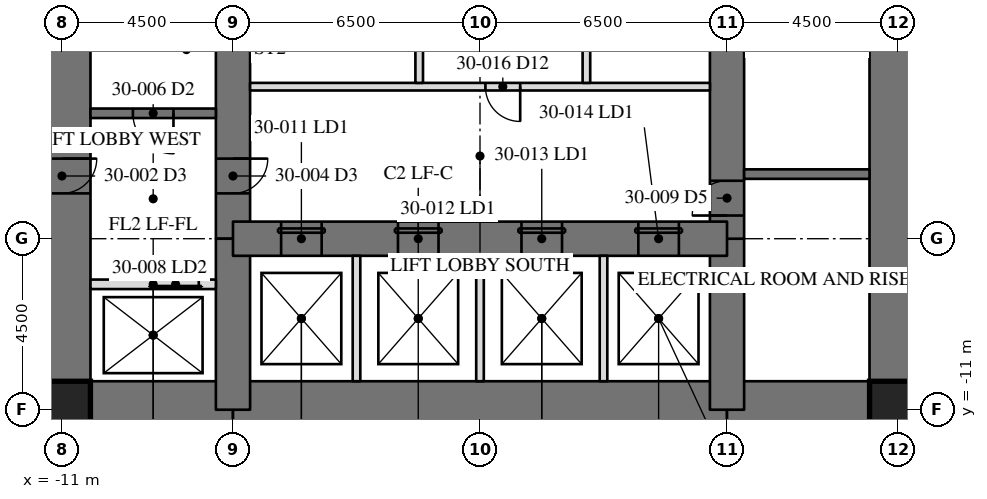
"""IFC4 building model, lengths in metres.
Left out: names, types, materials, properties, quantities, classifications, styles, units other than length and angle.
Written with IfcOpenShell. Run it as: python <this file> out.ifc"""

import sys

from ifc_helpers import new_model, si_unit, direction, frame, frame_2d, origin, origin_2d, place, context, subcontext, project, spatial, rectangle, hollow_rectangle, extrude, element, fill, save


model = new_model("IFC4")
c1 = context("Model", 3, precision=1e-05, world=origin(), true_north=direction((0.0, 1.0)))
c2 = subcontext(c1, "Body", "Model", "MODEL_VIEW")
j1 = project(units=[si_unit("LENGTHUNIT", "METRE"), si_unit("PLANEANGLEUNIT", "RADIAN")], contexts=[c1])
p1 = place(None, origin())
s1 = spatial("IfcSite", under=j1, at=p1, CompositionType="ELEMENT")
p2 = place(p1, origin())
s2 = spatial("IfcBuilding", under=s1, at=p2, CompositionType="ELEMENT")
p3 = place(p2, frame((0.0, 0.0, 129.5)))
s3 = spatial("IfcBuildingStorey", under=s2, at=p3, CompositionType="ELEMENT", Elevation=129.5)
p4 = place(p3, frame((11.0, -11.0, 0.0), z_axis=(0.0, 0.0, 1.0), x_axis=(0.0, 1.0, 0.0)))
e1 = element("IfcWall", 1, at=p4, inside=s3, PredefinedType="SHEAR", context=c2, shape_type="SweptSolid", body=[
    extrude(rectangle(XDim=22.0, YDim=1.5, at=frame_2d((11.0, 0.0))), origin(), (0.0, 0.0, 1.0), 4.1),
])
p5 = place(p4, frame((15.393, 0.0, 0.0)))
e2 = element("IfcOpeningElement", 2, at=p5, cuts=e1, PredefinedType="OPENING", context=c2, shape_type="SweptSolid", body=[
    extrude(rectangle(XDim=0.915, YDim=2.134, at=frame_2d((0.458, 1.067))), frame((0.0, 0.76, 0.0), z_axis=(0.0, -1.0, 0.0), x_axis=(1.0, 0.0, 0.0)), (0.0, 0.0, 1.0), 1.52),
])
p6 = place(p3, frame((-11.0, 11.0, 0.0), z_axis=(0.0, 0.0, 1.0), x_axis=(0.0, -1.0, 0.0)))
e3 = element("IfcWall", 3, at=p6, inside=s3, PredefinedType="SHEAR", context=c2, shape_type="SweptSolid", body=[
    extrude(rectangle(XDim=22.0, YDim=1.5, at=frame_2d((11.0, 0.0))), origin(), (0.0, 0.0, 1.0), 4.1),
])
p7 = place(p6, frame((15.393, 0.0, 0.0)))
e4 = element("IfcOpeningElement", 4, at=p7, cuts=e3, PredefinedType="OPENING", context=c2, shape_type="SweptSolid", body=[
    extrude(rectangle(XDim=0.915, YDim=2.134, at=frame_2d((0.458, 1.067))), frame((0.0, 0.76, 0.0), z_axis=(0.0, -1.0, 0.0), x_axis=(1.0, 0.0, 0.0)), (0.0, 0.0, 1.0), 1.52),
])
p8 = place(p3, frame((-11.0, -11.0, 0.0), z_axis=(0.0, 0.0, 1.0), x_axis=(1.0, 0.0, 0.0)))
e5 = element("IfcWall", 5, at=p8, inside=s3, PredefinedType="SHEAR", context=c2, shape_type="SweptSolid", body=[
    extrude(rectangle(XDim=4.5, YDim=1.5, at=frame_2d((2.25, 0.0))), origin(), (0.0, 0.0, 1.0), 4.1),
])
p9 = place(p3, frame((-6.5, -11.0, 0.0), z_axis=(0.0, 0.0, 1.0), x_axis=(1.0, 0.0, 0.0)))
e6 = element("IfcWall", 6, at=p9, inside=s3, PredefinedType="SHEAR", context=c2, shape_type="SweptSolid", body=[
    extrude(rectangle(XDim=13.0, YDim=1.5, at=frame_2d((6.5, 0.0))), origin(), (0.0, 0.0, 1.0), 4.1),
])
p10 = place(p3, frame((6.5, -11.0, 0.0), z_axis=(0.0, 0.0, 1.0), x_axis=(1.0, 0.0, 0.0)))
e7 = element("IfcWall", 7, at=p10, inside=s3, PredefinedType="SHEAR", context=c2, shape_type="SweptSolid", body=[
    extrude(rectangle(XDim=4.5, YDim=1.5, at=frame_2d((2.25, 0.0))), origin(), (0.0, 0.0, 1.0), 4.1),
])
p11 = place(p3, frame((6.5, -11.0, 0.0), z_axis=(0.0, 0.0, 1.0), x_axis=(0.0, 1.0, 0.0)))
e8 = element("IfcWall", 8, at=p11, inside=s3, PredefinedType="SHEAR", context=c2, shape_type="SweptSolid", body=[
    extrude(rectangle(XDim=4.5, YDim=0.9, at=frame_2d((2.25, 0.0))), origin(), (0.0, 0.0, 1.0), 4.1),
])
p12 = place(p3, frame((6.5, -6.5, 0.0), z_axis=(0.0, 0.0, 1.0), x_axis=(0.0, 1.0, 0.0)))
e9 = element("IfcWall", 9, at=p12, inside=s3, PredefinedType="SHEAR", context=c2, shape_type="SweptSolid", body=[
    extrude(rectangle(XDim=13.0, YDim=0.9, at=frame_2d((6.5, 0.0))), origin(), (0.0, 0.0, 1.0), 4.1),
])
p13 = place(p12, frame((10.893, 0.0, 0.0)))
e10 = element("IfcOpeningElement", 10, at=p13, cuts=e9, PredefinedType="OPENING", context=c2, shape_type="SweptSolid", body=[
    extrude(rectangle(XDim=0.915, YDim=2.134, at=frame_2d((0.458, 1.067))), frame((0.0, 0.46, 0.0), z_axis=(0.0, -1.0, 0.0), x_axis=(1.0, 0.0, 0.0)), (0.0, 0.0, 1.0), 0.92),
])
p14 = place(p12, frame((0.61, 0.0, 0.0)))
e11 = element("IfcOpeningElement", 11, at=p14, cuts=e9, PredefinedType="OPENING", context=c2, shape_type="SweptSolid", body=[
    extrude(rectangle(XDim=0.915, YDim=2.134, at=frame_2d((0.458, 1.067))), frame((0.0, 0.46, 0.0), z_axis=(0.0, -1.0, 0.0), x_axis=(1.0, 0.0, 0.0)), (0.0, 0.0, 1.0), 0.92),
])
p15 = place(p3, frame((-6.5, 6.5, 0.0), z_axis=(0.0, 0.0, 1.0), x_axis=(0.0, -1.0, 0.0)))
e12 = element("IfcWall", 12, at=p15, inside=s3, PredefinedType="SHEAR", context=c2, shape_type="SweptSolid", body=[
    extrude(rectangle(XDim=13.0, YDim=0.9, at=frame_2d((6.5, 0.0))), origin(), (0.0, 0.0, 1.0), 4.1),
])
p16 = place(p15, frame((10.893, 0.0, 0.0)))
e13 = element("IfcOpeningElement", 13, at=p16, cuts=e12, PredefinedType="OPENING", context=c2, shape_type="SweptSolid", body=[
    extrude(rectangle(XDim=0.915, YDim=2.134, at=frame_2d((0.458, 1.067))), frame((0.0, 0.46, 0.0), z_axis=(0.0, -1.0, 0.0), x_axis=(1.0, 0.0, 0.0)), (0.0, 0.0, 1.0), 0.92),
])
p17 = place(p15, frame((0.61, 0.0, 0.0)))
e14 = element("IfcOpeningElement", 14, at=p17, cuts=e12, PredefinedType="OPENING", context=c2, shape_type="SweptSolid", body=[
    extrude(rectangle(XDim=0.915, YDim=2.134, at=frame_2d((0.458, 1.067))), frame((0.0, 0.46, 0.0), z_axis=(0.0, -1.0, 0.0), x_axis=(1.0, 0.0, 0.0)), (0.0, 0.0, 1.0), 0.92),
])
p18 = place(p3, frame((-6.5, -6.5, 0.0), z_axis=(0.0, 0.0, 1.0), x_axis=(0.0, -1.0, 0.0)))
e15 = element("IfcWall", 15, at=p18, inside=s3, PredefinedType="SHEAR", context=c2, shape_type="SweptSolid", body=[
    extrude(rectangle(XDim=4.5, YDim=0.9, at=frame_2d((2.25, 0.0))), origin(), (0.0, 0.0, 1.0), 4.1),
])
p19 = place(p3, frame((-6.5, -6.5, 0.0), z_axis=(0.0, 0.0, 1.0), x_axis=(1.0, 0.0, 0.0)))
e16 = element("IfcWall", 16, at=p19, inside=s3, PredefinedType="SHEAR", context=c2, shape_type="SweptSolid", body=[
    extrude(rectangle(XDim=13.0, YDim=0.9, at=frame_2d((6.5, 0.0))), origin(), (0.0, 0.0, 1.0), 4.1),
])
p20 = place(p19, frame((1.267, 0.0, 0.0)))
e17 = element("IfcOpeningElement", 17, at=p20, cuts=e16, PredefinedType="OPENING", context=c2, shape_type="SweptSolid", body=[
    extrude(rectangle(XDim=1.067, YDim=2.134, at=frame_2d((0.533, 1.067))), frame((0.0, 0.46, 0.0), z_axis=(0.0, -1.0, 0.0), x_axis=(1.0, 0.0, 0.0)), (0.0, 0.0, 1.0), 0.92),
])
p21 = place(p19, frame((4.342, 0.0, 0.0)))
e18 = element("IfcOpeningElement", 18, at=p21, cuts=e16, PredefinedType="OPENING", context=c2, shape_type="SweptSolid", body=[
    extrude(rectangle(XDim=1.067, YDim=2.134, at=frame_2d((0.533, 1.067))), frame((0.0, 0.46, 0.0), z_axis=(0.0, -1.0, 0.0), x_axis=(1.0, 0.0, 0.0)), (0.0, 0.0, 1.0), 0.92),
])
p22 = place(p19, frame((7.592, 0.0, 0.0)))
e19 = element("IfcOpeningElement", 19, at=p22, cuts=e16, PredefinedType="OPENING", context=c2, shape_type="SweptSolid", body=[
    extrude(rectangle(XDim=1.067, YDim=2.134, at=frame_2d((0.533, 1.067))), frame((0.0, 0.46, 0.0), z_axis=(0.0, -1.0, 0.0), x_axis=(1.0, 0.0, 0.0)), (0.0, 0.0, 1.0), 0.92),
])
p23 = place(p19, frame((10.667, 0.0, 0.0)))
e20 = element("IfcOpeningElement", 20, at=p23, cuts=e16, PredefinedType="OPENING", context=c2, shape_type="SweptSolid", body=[
    extrude(rectangle(XDim=1.067, YDim=2.134, at=frame_2d((0.533, 1.067))), frame((0.0, 0.46, 0.0), z_axis=(0.0, -1.0, 0.0), x_axis=(1.0, 0.0, 0.0)), (0.0, 0.0, 1.0), 0.92),
])
for number, where, z_axis, x_axis in (
    (21, (-11.0, -11.0, 0.0), (0.0, 0.0, 1.0), (1.0, 0.0, 0.0)),
    (22, (11.0, -11.0, 0.0), (0.0, 0.0, 1.0), (1.0, 0.0, 0.0)),
):
    element("IfcColumn", number, at=place(p3, frame(where, z_axis=z_axis, x_axis=x_axis)), inside=s3, PredefinedType="COLUMN", context=c2, shape_type="SweptSolid", body=[
        extrude(hollow_rectangle(XDim=1.499, YDim=1.499, WallThickness=0.102, at=origin_2d()), origin(), (0.0, 0.0, 1.0), 4.1),
    ])
p24 = place(p3, frame((6.95, -4.8, 0.0), z_axis=(0.0, 0.0, 1.0), x_axis=(1.0, 0.0, 0.0)))
e23 = element("IfcWall", 23, at=p24, inside=s3, PredefinedType="SOLIDWALL", context=c2, shape_type="SweptSolid", body=[
    extrude(rectangle(XDim=3.3, YDim=0.25, at=frame_2d((1.65, 0.0))), origin(), (0.0, 0.0, 1.0), 3.91),
])
p25 = place(p3, frame((-6.95, -3.2, 0.0), z_axis=(0.0, 0.0, 1.0), x_axis=(-1.0, 0.0, 0.0)))
e24 = element("IfcWall", 24, at=p25, inside=s3, PredefinedType="SOLIDWALL", context=c2, shape_type="SweptSolid", body=[
    extrude(rectangle(XDim=3.3, YDim=0.25, at=frame_2d((1.65, 0.0))), origin(), (0.0, 0.0, 1.0), 3.91),
])
p26 = place(p25, frame((1.116, 0.0, 0.0)))
e25 = element("IfcOpeningElement", 25, at=p26, cuts=e24, PredefinedType="OPENING", context=c2, shape_type="SweptSolid", body=[
    extrude(rectangle(XDim=1.067, YDim=2.134, at=frame_2d((0.533, 1.067))), frame((0.0, 0.135, 0.0), z_axis=(0.0, -1.0, 0.0), x_axis=(1.0, 0.0, 0.0)), (0.0, 0.0, 1.0), 0.27),
])
p27 = place(p3, frame((-6.95, -7.7, 0.0), z_axis=(0.0, 0.0, 1.0), x_axis=(-1.0, 0.0, 0.0)))
e26 = element("IfcWall", 26, at=p27, inside=s3, PredefinedType="PARTITIONING", context=c2, shape_type="SweptSolid", body=[
    extrude(rectangle(XDim=3.3, YDim=0.25, at=frame_2d((1.65, 0.0))), origin(), (0.0, 0.0, 1.0), 3.91),
])
p28 = place(p27, frame((0.45, 0.0, 0.0)))
e27 = element("IfcOpeningElement", 27, at=p28, cuts=e26, PredefinedType="OPENING", context=c2, shape_type="SweptSolid", body=[
    extrude(rectangle(XDim=1.219, YDim=2.134, at=frame_2d((0.609, 1.067))), frame((0.0, 0.135, 0.0), z_axis=(0.0, -1.0, 0.0), x_axis=(1.0, 0.0, 0.0)), (0.0, 0.0, 1.0), 0.27),
])
p29 = place(p3, frame((6.05, -2.5, 0.0), z_axis=(0.0, 0.0, 1.0), x_axis=(-1.0, 0.0, 0.0)))
e28 = element("IfcWall", 28, at=p29, inside=s3, PredefinedType="PARTITIONING", context=c2, shape_type="SweptSolid", body=[
    extrude(rectangle(XDim=12.1, YDim=0.2, at=frame_2d((6.05, 0.0))), origin(), (0.0, 0.0, 1.0), 3.91),
])
p30 = place(p29, frame((4.992, 0.0, 0.0)))
e29 = element("IfcOpeningElement", 29, at=p30, cuts=e28, PredefinedType="OPENING", context=c2, shape_type="SweptSolid", body=[
    extrude(rectangle(XDim=0.915, YDim=2.134, at=frame_2d((0.458, 1.067))), frame((0.0, 0.11, 0.0), z_axis=(0.0, -1.0, 0.0), x_axis=(1.0, 0.0, 0.0)), (0.0, 0.0, 1.0), 0.22),
])
for number, where, z_axis, x_axis in (
    (30, (-3.25, -10.25, 0.0), (0.0, 0.0, 1.0), (0.0, 1.0, 0.0)),
    (31, (0.0, -10.25, 0.0), (0.0, 0.0, 1.0), (0.0, 1.0, 0.0)),
    (32, (3.25, -10.25, 0.0), (0.0, 0.0, 1.0), (0.0, 1.0, 0.0)),
):
    element("IfcWall", number, at=place(p3, frame(where, z_axis=z_axis, x_axis=x_axis)), inside=s3, PredefinedType="PARTITIONING", context=c2, shape_type="SweptSolid", body=[
        extrude(rectangle(XDim=3.3, YDim=0.2, at=frame_2d((1.65, 0.0))), origin(), (0.0, 0.0, 1.0), 3.91),
    ])
for number, where, z_axis, x_axis in (
    (33, (-1.6, -2.4, 0.0), (0.0, 0.0, 1.0), (0.0, 1.0, 0.0)),
    (34, (2.8, -2.4, 0.0), (0.0, 0.0, 1.0), (0.0, 1.0, 0.0)),
):
    element("IfcWall", number, at=place(p3, frame(where, z_axis=z_axis, x_axis=x_axis)), inside=s3, PredefinedType="PARTITIONING", context=c2, shape_type="SweptSolid", body=[
        extrude(rectangle(XDim=4.8, YDim=0.2, at=frame_2d((2.4, 0.0))), origin(), (0.0, 0.0, 1.0), 3.91),
    ])
p31 = place(p16, origin())
e35 = element("IfcDoor", 35, at=p31, inside=s3, OperationType="SINGLE_SWING_RIGHT", PredefinedType="DOOR", context=c2, shape_type="SweptSolid", body=[
    extrude(rectangle(XDim=0.915, YDim=2.134, at=frame_2d((0.458, 1.067))), frame((0.0, -0.375, 0.0), z_axis=(0.0, -1.0, 0.0), x_axis=(1.0, 0.0, 0.0)), (0.0, 0.0, 1.0), 0.05),
])
fill(e13, e35)
p32 = place(p26, origin())
e36 = element("IfcDoor", 36, at=p32, inside=s3, OperationType="SINGLE_SWING_LEFT", PredefinedType="DOOR", context=c2, shape_type="SweptSolid", body=[
    extrude(rectangle(XDim=1.067, YDim=2.134, at=frame_2d((0.533, 1.067))), frame((0.0, 0.025, 0.0), z_axis=(0.0, -1.0, 0.0), x_axis=(1.0, 0.0, 0.0)), (0.0, 0.0, 1.0), 0.05),
])
fill(e25, e36)
p33 = place(p28, origin())
e37 = element("IfcDoor", 37, at=p33, inside=s3, OperationType="SLIDING_TO_LEFT", PredefinedType="DOOR", context=c2, shape_type="SweptSolid", body=[
    extrude(rectangle(XDim=1.219, YDim=2.134, at=frame_2d((0.609, 1.067))), frame((0.0, 0.025, 0.0), z_axis=(0.0, -1.0, 0.0), x_axis=(1.0, 0.0, 0.0)), (0.0, 0.0, 1.0), 0.05),
])
fill(e27, e37)
p34 = place(p14, origin())
e38 = element("IfcDoor", 38, at=p34, inside=s3, OperationType="SINGLE_SWING_RIGHT", PredefinedType="DOOR", context=c2, shape_type="SweptSolid", body=[
    extrude(rectangle(XDim=0.915, YDim=2.134, at=frame_2d((0.458, 1.067))), frame((0.0, -0.375, 0.0), z_axis=(0.0, -1.0, 0.0), x_axis=(1.0, 0.0, 0.0)), (0.0, 0.0, 1.0), 0.05),
])
fill(e11, e38)
p35 = place(p20, origin())
e39 = element("IfcDoor", 39, at=p35, inside=s3, OperationType="SLIDING_TO_LEFT", PredefinedType="DOOR", context=c2, shape_type="SweptSolid", body=[
    extrude(rectangle(XDim=1.067, YDim=2.134, at=frame_2d((0.533, 1.067))), frame((0.0, -0.375, 0.0), z_axis=(0.0, -1.0, 0.0), x_axis=(1.0, 0.0, 0.0)), (0.0, 0.0, 1.0), 0.05),
])
fill(e17, e39)
p36 = place(p21, origin())
e40 = element("IfcDoor", 40, at=p36, inside=s3, OperationType="SLIDING_TO_LEFT", PredefinedType="DOOR", context=c2, shape_type="SweptSolid", body=[
    extrude(rectangle(XDim=1.067, YDim=2.134, at=frame_2d((0.533, 1.067))), frame((0.0, -0.375, 0.0), z_axis=(0.0, -1.0, 0.0), x_axis=(1.0, 0.0, 0.0)), (0.0, 0.0, 1.0), 0.05),
])
fill(e18, e40)
p37 = place(p22, origin())
e41 = element("IfcDoor", 41, at=p37, inside=s3, OperationType="SLIDING_TO_LEFT", PredefinedType="DOOR", context=c2, shape_type="SweptSolid", body=[
    extrude(rectangle(XDim=1.067, YDim=2.134, at=frame_2d((0.533, 1.067))), frame((0.0, -0.375, 0.0), z_axis=(0.0, -1.0, 0.0), x_axis=(1.0, 0.0, 0.0)), (0.0, 0.0, 1.0), 0.05),
])
fill(e19, e41)
p38 = place(p23, origin())
e42 = element("IfcDoor", 42, at=p38, inside=s3, OperationType="SLIDING_TO_LEFT", PredefinedType="DOOR", context=c2, shape_type="SweptSolid", body=[
    extrude(rectangle(XDim=1.067, YDim=2.134, at=frame_2d((0.533, 1.067))), frame((0.0, -0.375, 0.0), z_axis=(0.0, -1.0, 0.0), x_axis=(1.0, 0.0, 0.0)), (0.0, 0.0, 1.0), 0.05),
])
fill(e20, e42)
p39 = place(p30, origin())
e43 = element("IfcDoor", 43, at=p39, inside=s3, OperationType="SINGLE_SWING_LEFT", PredefinedType="DOOR", context=c2, shape_type="SweptSolid", body=[
    extrude(rectangle(XDim=0.915, YDim=2.134, at=frame_2d((0.458, 1.067))), frame((0.0, 0.025, 0.0), z_axis=(0.0, -1.0, 0.0), x_axis=(1.0, 0.0, 0.0)), (0.0, 0.0, 1.0), 0.05),
])
fill(e29, e43)
save(model, sys.argv[1])
